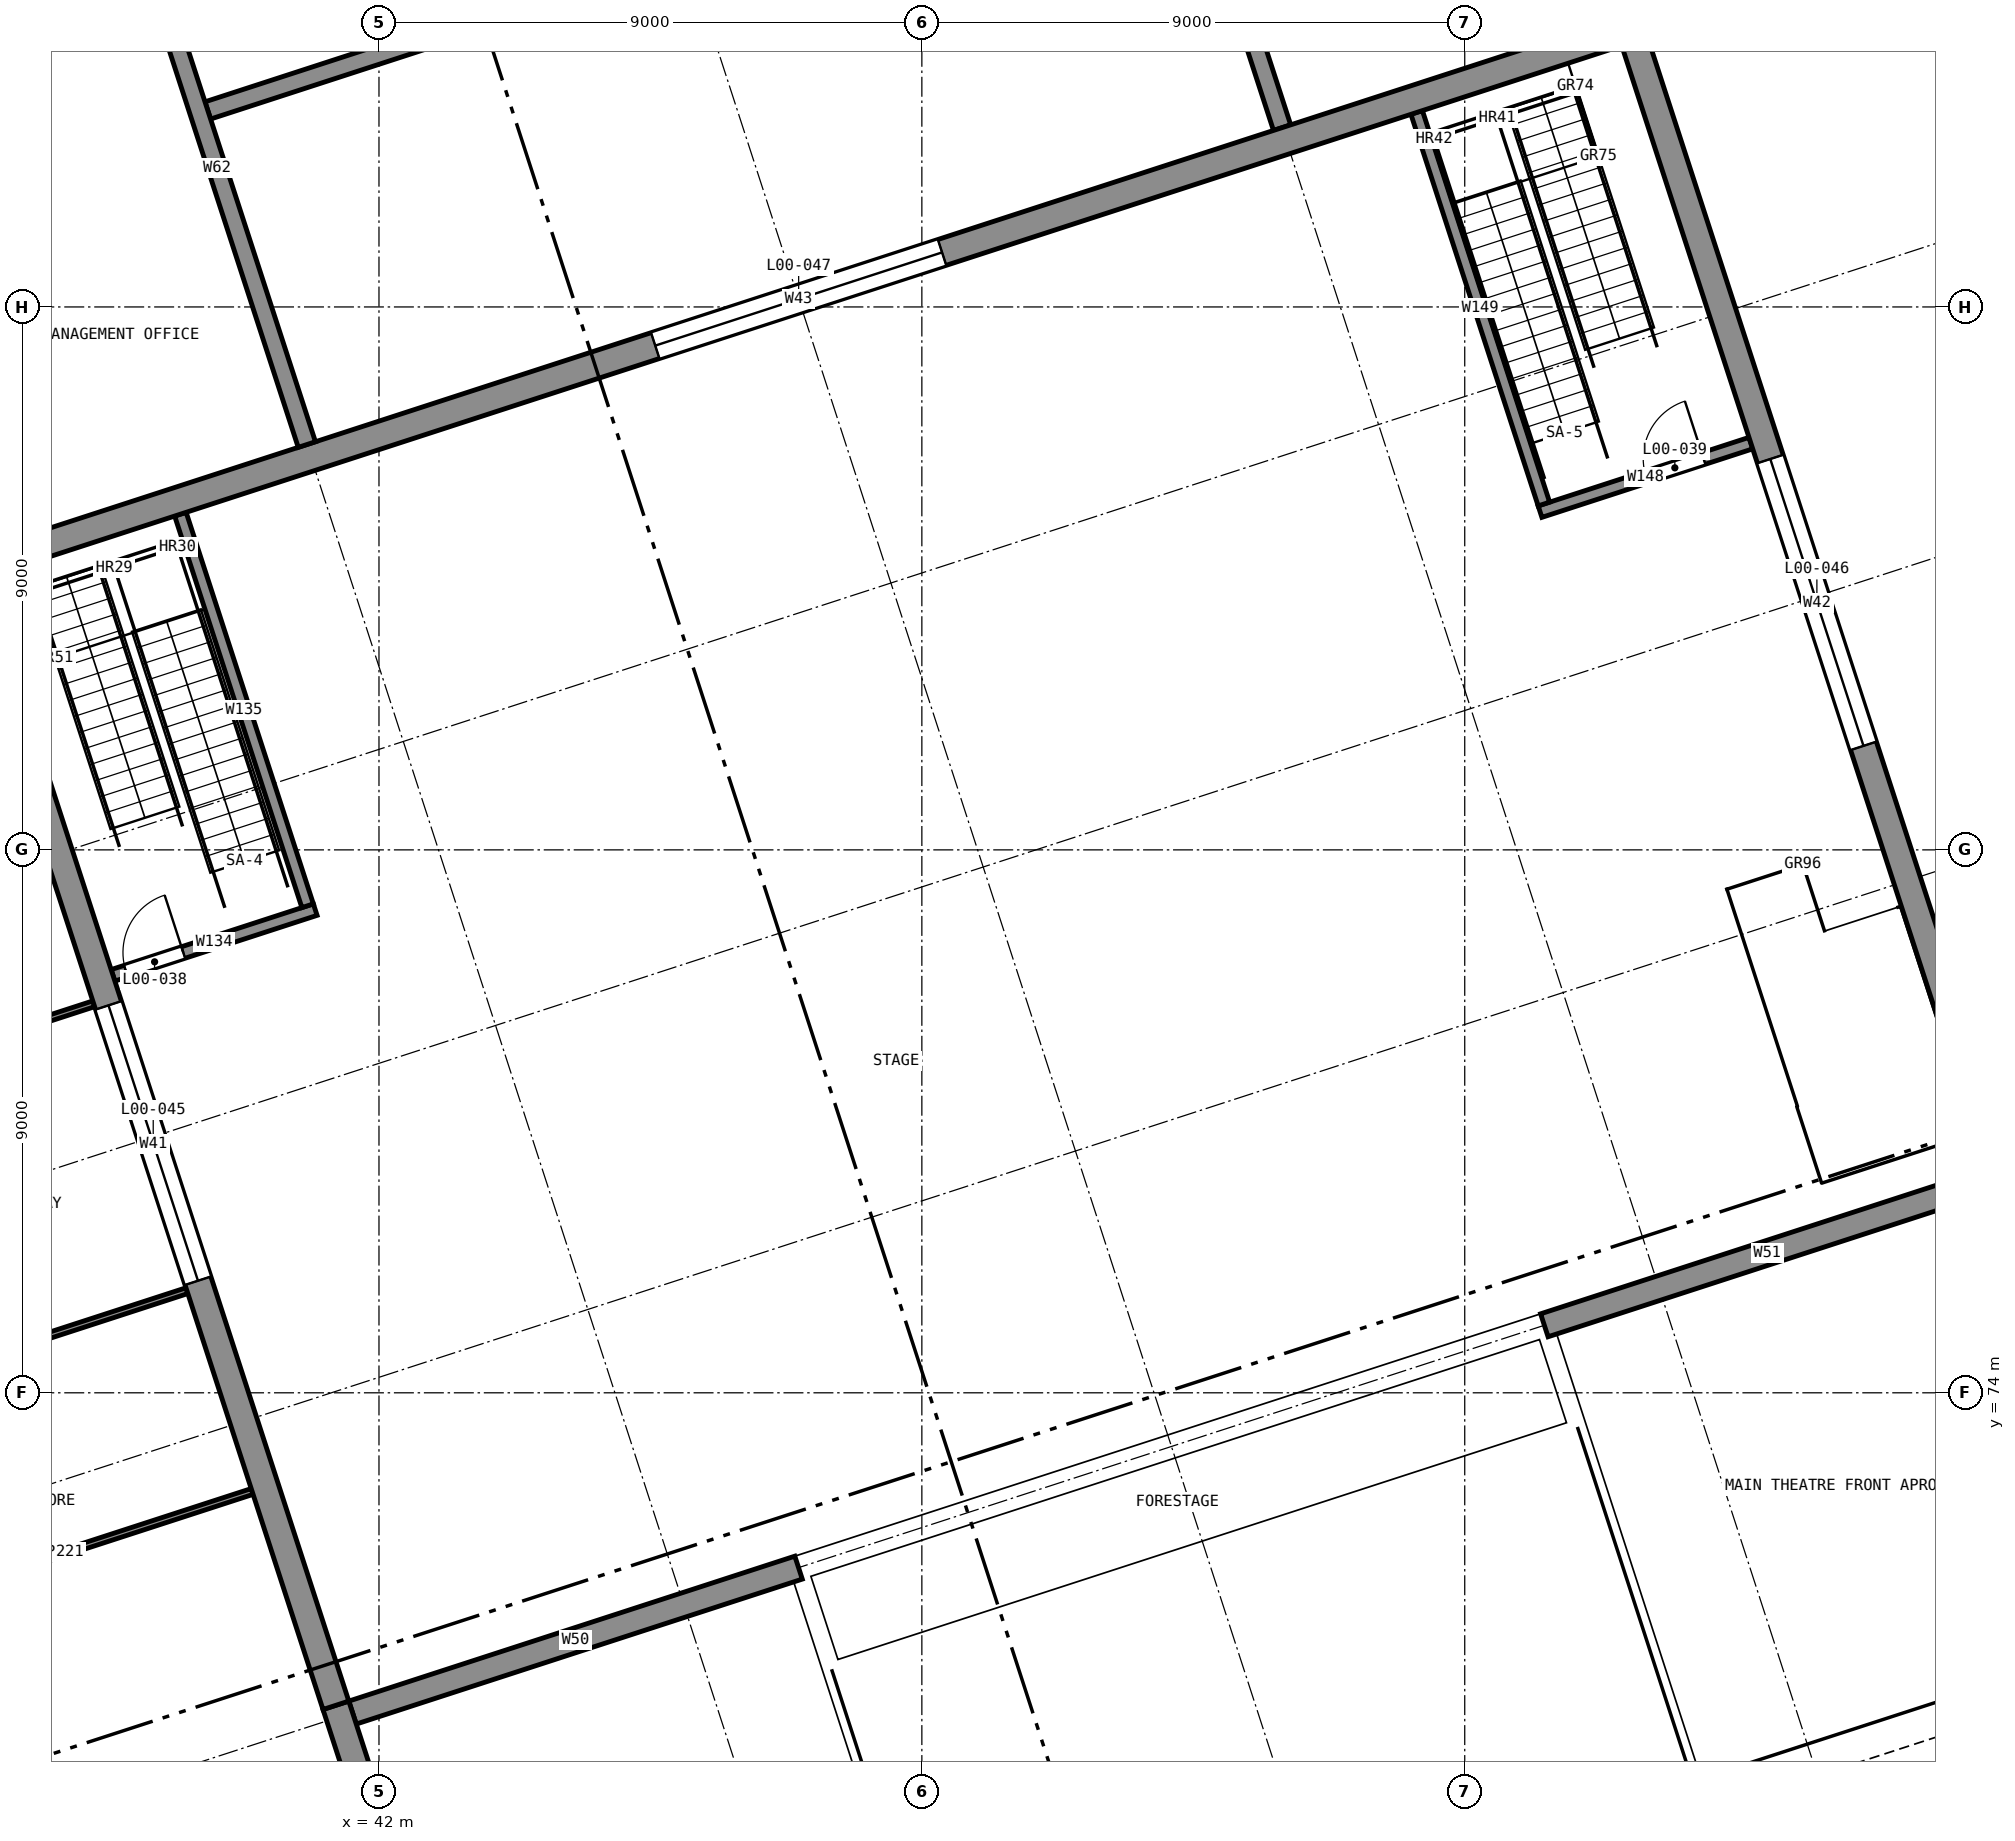
"""IFC4 building model, lengths in metres.
Left out: names, types, materials, properties, quantities, classifications, styles, units other than length and angle.
Written with IfcOpenShell. Run it as: python <this file> out.ifc"""

import sys

from ifc_helpers import new_model, si_unit, direction, frame, frame_2d, origin, place, context, subcontext, project, spatial, rectangle, extrude, element, fill, save


model = new_model("IFC4")
c1 = context("Model", 3, precision=1e-05, world=origin(), true_north=direction((0.0, 1.0)))
c2 = subcontext(c1, "Body", "Model", "MODEL_VIEW")
j1 = project(units=[si_unit("LENGTHUNIT", "METRE"), si_unit("PLANEANGLEUNIT", "RADIAN")], contexts=[c1])
p1 = place(None, origin())
s1 = spatial("IfcSite", under=j1, at=p1, CompositionType="ELEMENT")
p2 = place(p1, origin())
s2 = spatial("IfcBuilding", under=s1, at=p2, CompositionType="ELEMENT")
p3 = place(p2, origin())
s3 = spatial("IfcBuildingStorey", under=s2, at=p3, CompositionType="ELEMENT", Elevation=0.0)
p4 = place(p3, frame((49.93, 42.214, 0.0), z_axis=(0.0, 0.0, 1.0), x_axis=(-0.309016215614, 0.95105676933, 0.0)))
e1 = element("IfcWall", 1, at=p4, inside=s3, PredefinedType="SHEAR", context=c2, shape_type="SweptSolid", body=[
    extrude(rectangle(XDim=27.975, YDim=0.45, at=frame_2d((13.988, 0.0))), origin(), (0.0, 0.0, 1.0), 5.5),
])
p5 = place(p4, frame((13.775, 0.0, 0.0)))
e2 = element("IfcOpeningElement", 2, at=p5, cuts=e1, PredefinedType="OPENING", context=c2, shape_type="SweptSolid", body=[
    extrude(rectangle(XDim=2.0, YDim=2.4, at=frame_2d((1.0, 1.2))), frame((0.0, 0.235, 0.0), z_axis=(0.0, -1.0, 0.0), x_axis=(1.0, 0.0, 0.0)), (0.0, 0.0, 1.0), 0.47),
])
p6 = place(p3, frame((41.286, 68.82, 0.0), z_axis=(0.0, 0.0, 1.0), x_axis=(-0.309008517326, 0.951059270613, 0.0)))
e3 = element("IfcWall", 3, at=p6, inside=s3, PredefinedType="SHEAR", context=c2, shape_type="SweptSolid", body=[
    extrude(rectangle(XDim=19.575, YDim=0.45, at=frame_2d((9.788, 0.0))), origin(), (0.0, 0.0, 1.0), 5.5),
])
p7 = place(p6, frame((7.4, 0.0, 0.0)))
e4 = element("IfcOpeningElement", 4, at=p7, cuts=e3, PredefinedType="OPENING", context=c2, shape_type="SweptSolid", body=[
    extrude(rectangle(XDim=4.8, YDim=4.5, at=frame_2d((2.4, 2.25))), frame((0.0, 0.235, 0.0), z_axis=(0.0, -1.0, 0.0), x_axis=(1.0, 0.0, 0.0)), (0.0, 0.0, 1.0), 0.47),
])
p8 = place(p3, frame((68.866, 77.781, 0.0), z_axis=(0.0, 0.0, 1.0), x_axis=(-0.309019798438, 0.951055605195, 0.0)))
e5 = element("IfcWall", 5, at=p8, inside=s3, PredefinedType="SHEAR", context=c2, shape_type="SweptSolid", body=[
    extrude(rectangle(XDim=19.575, YDim=0.45, at=frame_2d((9.788, 0.0))), origin(), (0.0, 0.0, 1.0), 5.5),
])
p9 = place(p8, frame((7.3, 0.0, 0.0)))
e6 = element("IfcOpeningElement", 6, at=p9, cuts=e5, PredefinedType="OPENING", context=c2, shape_type="SweptSolid", body=[
    extrude(rectangle(XDim=5.0, YDim=4.5, at=frame_2d((2.5, 2.25))), frame((0.0, 0.235, 0.0), z_axis=(0.0, -1.0, 0.0), x_axis=(1.0, 0.0, 0.0)), (0.0, 0.0, 1.0), 0.47),
])
p10 = place(p3, frame((34.953, 87.581, 0.0), z_axis=(0.0, 0.0, 1.0), x_axis=(0.951059165148, 0.309008841924, 0.0)))
e7 = element("IfcWall", 7, at=p10, inside=s3, PredefinedType="SHEAR", context=c2, shape_type="SweptSolid", body=[
    extrude(rectangle(XDim=29.45, YDim=0.45, at=frame_2d((14.725, 0.0))), origin(), (0.0, 0.0, 1.0), 5.5),
])
p11 = place(p10, frame((12.225, 0.0, 0.0)))
e8 = element("IfcOpeningElement", 8, at=p11, cuts=e7, PredefinedType="OPENING", context=c2, shape_type="SweptSolid", body=[
    extrude(rectangle(XDim=5.0, YDim=4.5, at=frame_2d((2.5, 2.25))), frame((0.0, 0.235, 0.0), z_axis=(0.0, -1.0, 0.0), x_axis=(1.0, 0.0, 0.0)), (0.0, 0.0, 1.0), 0.47),
])
p12 = place(p3, frame((41.562, 68.699, 0.0), z_axis=(0.0, 0.0, 1.0), x_axis=(0.95105806443, 0.309012229664, 0.0)))
e9 = element("IfcWall", 9, at=p12, inside=s3, PredefinedType="SHEAR", context=c2, shape_type="SweptSolid", body=[
    extrude(rectangle(XDim=7.775, YDim=0.4, at=frame_2d((3.888, 0.0))), origin(), (0.0, 0.0, 1.0), 5.5),
])
p13 = place(p3, frame((61.32, 75.119, 0.0), z_axis=(0.0, 0.0, 1.0), x_axis=(0.951055065909, 0.30902145817, 0.0)))
e10 = element("IfcWall", 10, at=p13, inside=s3, PredefinedType="SHEAR", context=c2, shape_type="SweptSolid", body=[
    extrude(rectangle(XDim=7.775, YDim=0.4, at=frame_2d((3.887, 0.0))), origin(), (0.0, 0.0, 1.0), 5.5),
])
p14 = place(p3, frame((16.718, 92.171, 0.0), z_axis=(0.0, 0.0, 1.0), x_axis=(0.951055789165, 0.309019232243, 0.0)))
e11 = element("IfcWall", 11, at=p14, inside=s3, PredefinedType="SOLIDWALL", context=c2, shape_type="SweptSolid", body=[
    extrude(rectangle(XDim=22.3, YDim=0.3, at=frame_2d((11.15, 0.0))), origin(), (0.0, 0.0, 1.0), 5.5),
])
p15 = place(p14, frame((1.65, 0.0, 0.0)))
e12 = element("IfcOpeningElement", 12, at=p15, cuts=e11, PredefinedType="OPENING", context=c2, shape_type="SweptSolid", body=[
    extrude(rectangle(XDim=1.2, YDim=2.1, at=frame_2d((0.6, 1.05))), frame((0.0, 0.16, 0.0), z_axis=(0.0, -1.0, 0.0), x_axis=(1.0, 0.0, 0.0)), (0.0, 0.0, 1.0), 0.32),
])
p16 = place(p3, frame((37.83, 98.873, 0.0), z_axis=(0.0, 0.0, 1.0), x_axis=(0.30902011435, -0.951055502548, 0.0)))
e13 = element("IfcWall", 13, at=p16, inside=s3, PredefinedType="SOLIDWALL", context=c2, shape_type="SweptSolid", body=[
    extrude(rectangle(XDim=9.625, YDim=0.3, at=frame_2d((4.812, 0.0))), origin(), (0.0, 0.0, 1.0), 5.5),
])
p17 = place(p3, frame((39.162, 95.258, 0.0), z_axis=(0.0, 0.0, 1.0), x_axis=(0.951058550479, 0.309010733732, 0.0)))
e14 = element("IfcWall", 14, at=p17, inside=s3, PredefinedType="SOLIDWALL", context=c2, shape_type="SweptSolid", body=[
    extrude(rectangle(XDim=17.0, YDim=0.3, at=frame_2d((8.5, 0.0))), origin(), (0.0, 0.0, 1.0), 5.5),
])
p18 = place(p17, frame((7.35, 0.0, 0.0)))
e15 = element("IfcOpeningElement", 15, at=p18, cuts=e14, PredefinedType="OPENING", context=c2, shape_type="SweptSolid", body=[
    extrude(rectangle(XDim=2.0, YDim=2.4, at=frame_2d((1.0, 1.2))), frame((0.0, 0.16, 0.0), z_axis=(0.0, -1.0, 0.0), x_axis=(1.0, 0.0, 0.0)), (0.0, 0.0, 1.0), 0.32),
])
p19 = place(p3, frame((55.234, 100.322, 0.0), z_axis=(0.0, 0.0, 1.0), x_axis=(0.309031112369, -0.951051928965, 0.0)))
e16 = element("IfcWall", 16, at=p19, inside=s3, PredefinedType="SOLIDWALL", context=c2, shape_type="SweptSolid", body=[
    extrude(rectangle(XDim=5.625, YDim=0.3, at=frame_2d((2.812, 0.0))), origin(), (0.0, 0.0, 1.0), 5.5),
])
p20 = place(p3, frame((37.591, 80.92, 0.0), z_axis=(0.0, 0.0, 1.0), x_axis=(0.951052389726, 0.30902969436, 0.0)))
e17 = element("IfcWall", 17, at=p20, inside=s3, PredefinedType="SOLIDWALL", context=c2, shape_type="SweptSolid", body=[
    extrude(rectangle(XDim=3.525, YDim=0.2, at=frame_2d((1.763, 0.0))), origin(), (0.0, 0.0, 1.0), 5.5),
])
p21 = place(p20, frame((0.225, 0.0, 0.0)))
e18 = element("IfcOpeningElement", 18, at=p21, cuts=e17, PredefinedType="OPENING", context=c2, shape_type="SweptSolid", body=[
    extrude(rectangle(XDim=1.0, YDim=2.1, at=frame_2d((0.5, 1.05))), frame((0.0, 0.11, 0.0), z_axis=(0.0, -1.0, 0.0), x_axis=(1.0, 0.0, 0.0)), (0.0, 0.0, 1.0), 0.22),
])
p22 = place(p3, frame((40.817, 82.074, 0.0), z_axis=(0.0, 0.0, 1.0), x_axis=(-0.309028643499, 0.951052731186, 0.0)))
e19 = element("IfcWall", 19, at=p22, inside=s3, PredefinedType="SOLIDWALL", context=c2, shape_type="SweptSolid", body=[
    extrude(rectangle(XDim=6.825, YDim=0.2, at=frame_2d((3.413, 0.0))), origin(), (0.0, 0.0, 1.0), 5.5),
])
p23 = place(p3, frame((64.743, 89.743, 0.0), z_axis=(0.0, 0.0, 1.0), x_axis=(-0.95104773735, -0.309044011885, 0.0)))
e20 = element("IfcWall", 20, at=p23, inside=s3, PredefinedType="SOLIDWALL", context=c2, shape_type="SweptSolid", body=[
    extrude(rectangle(XDim=3.675, YDim=0.2, at=frame_2d((1.837, 0.0))), origin(), (0.0, 0.0, 1.0), 5.5),
])
p24 = place(p23, frame((0.825, 0.0, 0.0)))
e21 = element("IfcOpeningElement", 21, at=p24, cuts=e20, PredefinedType="OPENING", context=c2, shape_type="SweptSolid", body=[
    extrude(rectangle(XDim=1.0, YDim=2.1, at=frame_2d((0.5, 1.05))), frame((0.0, 0.11, 0.0), z_axis=(0.0, -1.0, 0.0), x_axis=(1.0, 0.0, 0.0)), (0.0, 0.0, 1.0), 0.22),
])
p25 = place(p3, frame((61.312, 88.733, 0.0), z_axis=(0.0, 0.0, 1.0), x_axis=(-0.309028643499, 0.951052731186, 0.0)))
e22 = element("IfcWall", 22, at=p25, inside=s3, PredefinedType="SOLIDWALL", context=c2, shape_type="SweptSolid", body=[
    extrude(rectangle(XDim=6.825, YDim=0.2, at=frame_2d((3.413, 0.0))), origin(), (0.0, 0.0, 1.0), 5.5),
])
p26 = place(p3, frame((37.956, 48.812, 0.0), z_axis=(0.0, 0.0, 1.0), x_axis=(-0.30901736393, 0.951056396219, 0.0)))
e23 = element("IfcWall", 23, at=p26, inside=s3, PredefinedType="SOLIDWALL", context=c2, shape_type="SweptSolid", body=[
    extrude(rectangle(XDim=41.7, YDim=0.22, at=frame_2d((20.85, 0.0))), origin(), (0.0, 0.0, 1.0), 5.2),
])
p27 = place(p26, frame((2.009, 0.0, 0.0)))
e24 = element("IfcOpeningElement", 24, at=p27, cuts=e23, PredefinedType="OPENING", context=c2, shape_type="SweptSolid", body=[
    extrude(rectangle(XDim=1.0, YDim=2.1, at=frame_2d((0.5, 1.05))), frame((0.0, 0.12, 0.0), z_axis=(0.0, -1.0, 0.0), x_axis=(1.0, 0.0, 0.0)), (0.0, 0.0, 1.0), 0.24),
])
p28 = place(p26, frame((11.495, 0.0, 0.0)))
e25 = element("IfcOpeningElement", 25, at=p28, cuts=e23, PredefinedType="OPENING", context=c2, shape_type="SweptSolid", body=[
    extrude(rectangle(XDim=1.0, YDim=2.1, at=frame_2d((0.5, 1.05))), frame((0.0, 0.12, 0.0), z_axis=(0.0, -1.0, 0.0), x_axis=(1.0, 0.0, 0.0)), (0.0, 0.0, 1.0), 0.24),
])
p29 = place(p26, frame((21.7, 0.0, 0.0)))
e26 = element("IfcOpeningElement", 26, at=p29, cuts=e23, PredefinedType="OPENING", context=c2, shape_type="SweptSolid", body=[
    extrude(rectangle(XDim=1.2, YDim=2.1, at=frame_2d((0.6, 1.05))), frame((0.0, 0.12, 0.0), z_axis=(0.0, -1.0, 0.0), x_axis=(1.0, 0.0, 0.0)), (0.0, 0.0, 1.0), 0.24),
])
p30 = place(p26, frame((26.7, 0.0, 0.0)))
e27 = element("IfcOpeningElement", 27, at=p30, cuts=e23, PredefinedType="OPENING", context=c2, shape_type="SweptSolid", body=[
    extrude(rectangle(XDim=1.2, YDim=2.1, at=frame_2d((0.6, 1.05))), frame((0.0, 0.12, 0.0), z_axis=(0.0, -1.0, 0.0), x_axis=(1.0, 0.0, 0.0)), (0.0, 0.0, 1.0), 0.24),
])
p31 = place(p26, frame((31.739, 0.0, 0.0)))
e28 = element("IfcOpeningElement", 28, at=p31, cuts=e23, PredefinedType="OPENING", context=c2, shape_type="SweptSolid", body=[
    extrude(rectangle(XDim=1.2, YDim=2.1, at=frame_2d((0.6, 1.05))), frame((0.0, 0.12, 0.0), z_axis=(0.0, -1.0, 0.0), x_axis=(1.0, 0.0, 0.0)), (0.0, 0.0, 1.0), 0.24),
])
p32 = place(p3, frame((40.333, 49.584, 0.0), z_axis=(0.0, 0.0, 1.0), x_axis=(-0.309015643281, 0.951056955291, 0.0)))
e29 = element("IfcWall", 29, at=p32, inside=s3, PredefinedType="SOLIDWALL", context=c2, shape_type="SweptSolid", body=[
    extrude(rectangle(XDim=41.7, YDim=0.22, at=frame_2d((20.85, 0.0))), origin(), (0.0, 0.0, 1.0), 5.2),
])
p33 = place(p32, frame((1.9, 0.0, 0.0)))
e30 = element("IfcOpeningElement", 30, at=p33, cuts=e29, PredefinedType="OPENING", context=c2, shape_type="SweptSolid", body=[
    extrude(rectangle(XDim=1.2, YDim=2.1, at=frame_2d((0.6, 1.05))), frame((0.0, 0.12, 0.0), z_axis=(0.0, -1.0, 0.0), x_axis=(1.0, 0.0, 0.0)), (0.0, 0.0, 1.0), 0.24),
])
p34 = place(p32, frame((8.185, 0.0, 0.0)))
e31 = element("IfcOpeningElement", 31, at=p34, cuts=e29, PredefinedType="OPENING", context=c2, shape_type="SweptSolid", body=[
    extrude(rectangle(XDim=1.2, YDim=2.1, at=frame_2d((0.6, 1.05))), frame((0.0, 0.12, 0.0), z_axis=(0.0, -1.0, 0.0), x_axis=(1.0, 0.0, 0.0)), (0.0, 0.0, 1.0), 0.24),
])
p35 = place(p32, frame((16.475, 0.0, 0.0)))
e32 = element("IfcOpeningElement", 32, at=p35, cuts=e29, PredefinedType="OPENING", context=c2, shape_type="SweptSolid", body=[
    extrude(rectangle(XDim=1.0, YDim=2.1, at=frame_2d((0.5, 1.05))), frame((0.0, 0.12, 0.0), z_axis=(0.0, -1.0, 0.0), x_axis=(1.0, 0.0, 0.0)), (0.0, 0.0, 1.0), 0.24),
])
p36 = place(p32, frame((23.05, 0.0, 0.0)))
e33 = element("IfcOpeningElement", 33, at=p36, cuts=e29, PredefinedType="OPENING", context=c2, shape_type="SweptSolid", body=[
    extrude(rectangle(XDim=1.0, YDim=2.1, at=frame_2d((0.5, 1.05))), frame((0.0, 0.12, 0.0), z_axis=(0.0, -1.0, 0.0), x_axis=(1.0, 0.0, 0.0)), (0.0, 0.0, 1.0), 0.24),
])
p37 = place(p32, frame((27.3, 0.0, 0.0)))
e34 = element("IfcOpeningElement", 34, at=p37, cuts=e29, PredefinedType="OPENING", context=c2, shape_type="SweptSolid", body=[
    extrude(rectangle(XDim=1.0, YDim=2.1, at=frame_2d((0.5, 1.05))), frame((0.0, 0.12, 0.0), z_axis=(0.0, -1.0, 0.0), x_axis=(1.0, 0.0, 0.0)), (0.0, 0.0, 1.0), 0.24),
])
p38 = place(p32, frame((32.761, 0.0, 0.0)))
e35 = element("IfcOpeningElement", 35, at=p38, cuts=e29, PredefinedType="OPENING", context=c2, shape_type="SweptSolid", body=[
    extrude(rectangle(XDim=1.0, YDim=2.1, at=frame_2d((0.5, 1.05))), frame((0.0, 0.12, 0.0), z_axis=(0.0, -1.0, 0.0), x_axis=(1.0, 0.0, 0.0)), (0.0, 0.0, 1.0), 0.24),
])
for number, where, z_axis, x_axis in (
    (36, (33.701, 70.351, 0.0), (0.0, 0.0, 1.0), (0.951, 0.309, 0.0)),
    (37, (32.62, 73.68, 0.0), (0.0, 0.0, 1.0), (0.951, 0.309, 0.0)),
    (38, (31.075, 78.435, 0.0), (0.0, 0.0, 1.0), (0.951, 0.309, 0.0)),
):
    element("IfcWall", number, at=place(p3, frame(where, z_axis=z_axis, x_axis=x_axis)), inside=s3, PredefinedType="PARTITIONING", context=c2, shape_type="SweptSolid", body=[
        extrude(rectangle(XDim=6.515, YDim=0.1, at=frame_2d((3.257, 0.0))), origin(), (0.0, 0.0, 1.0), 5.2),
    ])
p39 = place(p21, origin())
e39 = element("IfcDoor", 39, at=p39, inside=s3, OperationType="SINGLE_SWING_LEFT", PredefinedType="DOOR", context=c2, shape_type="SweptSolid", body=[
    extrude(rectangle(XDim=1.0, YDim=2.1, at=frame_2d((0.5, 1.05))), frame((0.0, 0.025, 0.0), z_axis=(0.0, -1.0, 0.0), x_axis=(1.0, 0.0, 0.0)), (0.0, 0.0, 1.0), 0.05),
])
fill(e18, e39)
p40 = place(p24, frame((1.0, 0.0, 0.0), z_axis=(0.0, 0.0, 1.0), x_axis=(-1.0, 0.0, 0.0)))
e40 = element("IfcDoor", 40, at=p40, inside=s3, OperationType="SINGLE_SWING_LEFT", PredefinedType="DOOR", context=c2, shape_type="SweptSolid", body=[
    extrude(rectangle(XDim=1.0, YDim=2.1, at=frame_2d((0.5, 1.05))), frame((0.0, 0.025, 0.0), z_axis=(0.0, -1.0, 0.0), x_axis=(1.0, 0.0, 0.0)), (0.0, 0.0, 1.0), 0.05),
])
fill(e21, e40)
p41 = place(p7, origin())
e41 = element("IfcDoor", 41, at=p41, inside=s3, OperationType="SLIDING_TO_LEFT", PredefinedType="DOOR", context=c2, shape_type="SweptSolid", body=[
    extrude(rectangle(XDim=4.8, YDim=4.5, at=frame_2d((2.4, 2.25))), frame((0.0, 0.025, 0.0), z_axis=(0.0, -1.0, 0.0), x_axis=(1.0, 0.0, 0.0)), (0.0, 0.0, 1.0), 0.05),
])
fill(e4, e41)
p42 = place(p9, origin())
e42 = element("IfcDoor", 42, at=p42, inside=s3, OperationType="SLIDING_TO_LEFT", PredefinedType="DOOR", context=c2, shape_type="SweptSolid", body=[
    extrude(rectangle(XDim=5.0, YDim=4.5, at=frame_2d((2.5, 2.25))), frame((0.0, 0.025, 0.0), z_axis=(0.0, -1.0, 0.0), x_axis=(1.0, 0.0, 0.0)), (0.0, 0.0, 1.0), 0.05),
])
fill(e6, e42)
p43 = place(p11, origin())
e43 = element("IfcDoor", 43, at=p43, inside=s3, OperationType="SLIDING_TO_LEFT", PredefinedType="DOOR", context=c2, shape_type="SweptSolid", body=[
    extrude(rectangle(XDim=5.0, YDim=4.5, at=frame_2d((2.5, 2.25))), frame((0.0, 0.025, 0.0), z_axis=(0.0, -1.0, 0.0), x_axis=(1.0, 0.0, 0.0)), (0.0, 0.0, 1.0), 0.05),
])
fill(e8, e43)
save(model, sys.argv[1])
